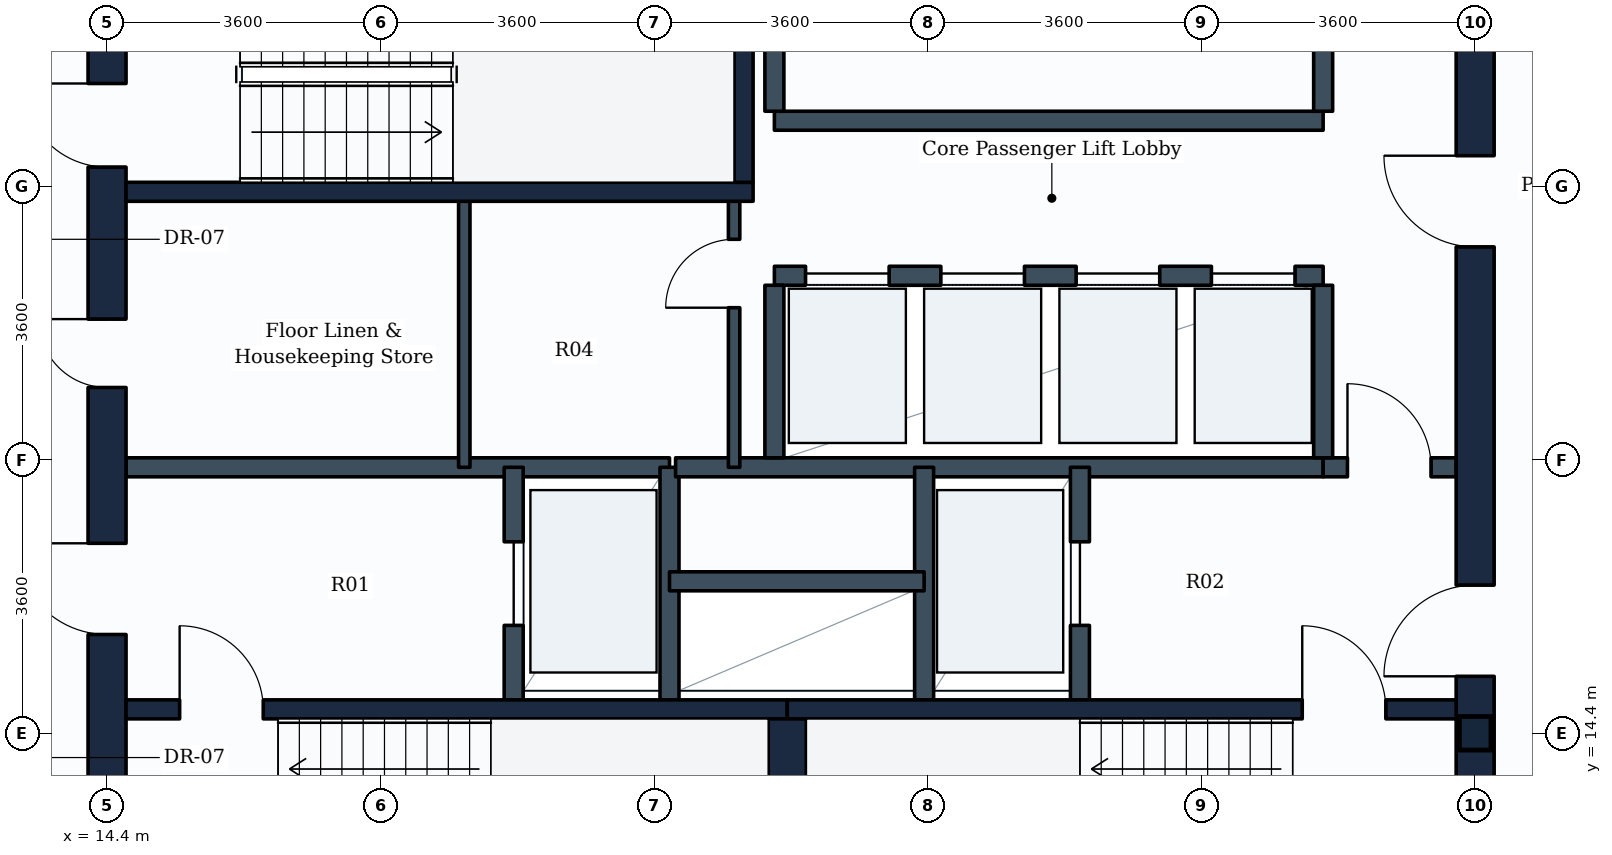
"""IFC4 building model, lengths in metres.
Left out: names, types, materials, properties, quantities, classifications, styles, units other than length and angle.
Written with IfcOpenShell. Run it as: python <this file> out.ifc"""

import sys

from ifc_helpers import new_model, si_unit, direction, frame, frame_2d, origin, origin_2d, place, context, subcontext, project, spatial, rectangle, i_section, extrude, element, fill, save


model = new_model("IFC4")
c1 = context("Model", 3, precision=1e-05, world=origin(), true_north=direction((0.0, 1.0)))
c2 = subcontext(c1, "Body", "Model", "MODEL_VIEW")
j1 = project(units=[si_unit("LENGTHUNIT", "METRE"), si_unit("PLANEANGLEUNIT", "RADIAN")], contexts=[c1])
p1 = place(None, origin())
s1 = spatial("IfcSite", under=j1, at=p1, CompositionType="ELEMENT")
p2 = place(p1, origin())
s2 = spatial("IfcBuilding", under=s1, at=p2, CompositionType="ELEMENT")
p3 = place(p2, frame((0.0, 0.0, 135.2)))
s3 = spatial("IfcBuildingStorey", under=s2, at=p3, CompositionType="ELEMENT", Elevation=135.2)
p4 = place(p3, frame((32.4, 14.4, 0.0), z_axis=(0.0, 0.0, 1.0), x_axis=(1.0, 0.0, 0.0)))
e1 = element("IfcColumn", 1, at=p4, inside=s3, PredefinedType="COLUMN", context=c2, shape_type="SweptSolid", body=[
    extrude(i_section(OverallWidth=0.416, OverallDepth=0.442, WebThickness=0.025, FlangeThickness=0.041, FilletRadius=0.015, at=origin_2d()), origin(), (0.0, 0.0, 1.0), 3.8),
])
p5 = place(p3, frame((14.4, 10.8, 0.0), z_axis=(0.0, 0.0, 1.0), x_axis=(0.0, 1.0, 0.0)))
e2 = element("IfcWall", 2, at=p5, inside=s3, PredefinedType="SHEAR", context=c2, shape_type="SweptSolid", body=[
    extrude(rectangle(XDim=14.4, YDim=0.5, at=frame_2d((7.2, 0.0))), origin(), (0.0, 0.0, 1.0), 3.55),
])
p6 = place(p5, frame((11.05, 0.0, 0.0)))
e3 = element("IfcOpeningElement", 3, at=p6, cuts=e2, PredefinedType="OPENING", context=c2, shape_type="SweptSolid", body=[
    extrude(rectangle(XDim=1.1, YDim=2.1, at=frame_2d((0.55, 1.05))), frame((0.0, 0.26, 0.0), z_axis=(0.0, -1.0, 0.0), x_axis=(1.0, 0.0, 0.0)), (0.0, 0.0, 1.0), 0.52),
])
p7 = place(p5, frame((4.9, 0.0, 0.0)))
e4 = element("IfcOpeningElement", 4, at=p7, cuts=e2, PredefinedType="OPENING", context=c2, shape_type="SweptSolid", body=[
    extrude(rectangle(XDim=1.2, YDim=2.1, at=frame_2d((0.6, 1.05))), frame((0.0, 0.26, 0.0), z_axis=(0.0, -1.0, 0.0), x_axis=(1.0, 0.0, 0.0)), (0.0, 0.0, 1.0), 0.52),
])
p8 = place(p5, frame((8.15, 0.0, 0.0)))
e5 = element("IfcOpeningElement", 5, at=p8, cuts=e2, PredefinedType="OPENING", context=c2, shape_type="SweptSolid", body=[
    extrude(rectangle(XDim=0.9, YDim=2.1, at=frame_2d((0.45, 1.05))), frame((0.0, 0.26, 0.0), z_axis=(0.0, -1.0, 0.0), x_axis=(1.0, 0.0, 0.0)), (0.0, 0.0, 1.0), 0.52),
])
p9 = place(p3, frame((32.4, 10.8, 0.0), z_axis=(0.0, 0.0, 1.0), x_axis=(0.0, 1.0, 0.0)))
e6 = element("IfcWall", 6, at=p9, inside=s3, PredefinedType="SHEAR", context=c2, shape_type="SweptSolid", body=[
    extrude(rectangle(XDim=14.4, YDim=0.5, at=frame_2d((7.2, 0.0))), origin(), (0.0, 0.0, 1.0), 3.55),
])
p10 = place(p9, frame((4.35, 0.0, 0.0)))
e7 = element("IfcOpeningElement", 7, at=p10, cuts=e6, PredefinedType="OPENING", context=c2, shape_type="SweptSolid", body=[
    extrude(rectangle(XDim=1.2, YDim=2.1, at=frame_2d((0.6, 1.05))), frame((0.0, 0.26, 0.0), z_axis=(0.0, -1.0, 0.0), x_axis=(1.0, 0.0, 0.0)), (0.0, 0.0, 1.0), 0.52),
])
p11 = place(p9, frame((10.0, 0.0, 0.0)))
e8 = element("IfcOpeningElement", 8, at=p11, cuts=e6, PredefinedType="OPENING", context=c2, shape_type="SweptSolid", body=[
    extrude(rectangle(XDim=1.2, YDim=2.1, at=frame_2d((0.6, 1.05))), frame((0.0, 0.26, 0.0), z_axis=(0.0, -1.0, 0.0), x_axis=(1.0, 0.0, 0.0)), (0.0, 0.0, 1.0), 0.52),
])
p12 = place(p3, frame((14.65, 14.715, 0.0), z_axis=(0.0, 0.0, 1.0), x_axis=(1.0, 0.0, 0.0)))
e9 = element("IfcWall", 9, at=p12, inside=s3, PredefinedType="SHEAR", context=c2, shape_type="SweptSolid", body=[
    extrude(rectangle(XDim=8.7, YDim=0.25, at=frame_2d((4.35, 0.0))), origin(), (0.0, 0.0, 1.0), 3.55),
])
p13 = place(p12, frame((0.705, 0.0, 0.0)))
e10 = element("IfcOpeningElement", 10, at=p13, cuts=e9, PredefinedType="OPENING", context=c2, shape_type="SweptSolid", body=[
    extrude(rectangle(XDim=1.1, YDim=2.1, at=frame_2d((0.55, 1.05))), frame((0.0, 0.135, 0.0), z_axis=(0.0, -1.0, 0.0), x_axis=(1.0, 0.0, 0.0)), (0.0, 0.0, 1.0), 0.27),
])
p14 = place(p3, frame((23.35, 14.715, 0.0), z_axis=(0.0, 0.0, 1.0), x_axis=(1.0, 0.0, 0.0)))
e11 = element("IfcWall", 11, at=p14, inside=s3, PredefinedType="SHEAR", context=c2, shape_type="SweptSolid", body=[
    extrude(rectangle(XDim=8.8, YDim=0.25, at=frame_2d((4.4, 0.0))), origin(), (0.0, 0.0, 1.0), 3.55),
])
p15 = place(p14, frame((6.775, 0.0, 0.0)))
e12 = element("IfcOpeningElement", 12, at=p15, cuts=e11, PredefinedType="OPENING", context=c2, shape_type="SweptSolid", body=[
    extrude(rectangle(XDim=1.1, YDim=2.1, at=frame_2d((0.55, 1.05))), frame((0.0, 0.135, 0.0), z_axis=(0.0, -1.0, 0.0), x_axis=(1.0, 0.0, 0.0)), (0.0, 0.0, 1.0), 0.27),
])
p16 = place(p3, frame((23.35, 11.75, 0.0), z_axis=(0.0, 0.0, 1.0), x_axis=(0.0, 1.0, 0.0)))
e13 = element("IfcWall", 13, at=p16, inside=s3, PredefinedType="SHEAR", context=c2, shape_type="SweptSolid", body=[
    extrude(rectangle(XDim=2.84, YDim=0.5, at=frame_2d((1.42, 0.0))), origin(), (0.0, 0.0, 1.0), 3.55),
])
p17 = place(p3, frame((14.65, 21.525, 0.0), z_axis=(0.0, 0.0, 1.0), x_axis=(1.0, 0.0, 0.0)))
e14 = element("IfcWall", 14, at=p17, inside=s3, PredefinedType="SHEAR", context=c2, shape_type="SweptSolid", body=[
    extrude(rectangle(XDim=8.25, YDim=0.25, at=frame_2d((4.125, 0.0))), origin(), (0.0, 0.0, 1.0), 3.55),
])
p18 = place(p3, frame((22.775, 21.65, 0.0), z_axis=(0.0, 0.0, 1.0), x_axis=(0.0, 1.0, 0.0)))
e15 = element("IfcWall", 15, at=p18, inside=s3, PredefinedType="SHEAR", context=c2, shape_type="SweptSolid", body=[
    extrude(rectangle(XDim=2.84, YDim=0.25, at=frame_2d((1.42, 0.0))), origin(), (0.0, 0.0, 1.0), 3.55),
])
p19 = place(p3, frame((14.65, 17.9, 0.0), z_axis=(0.0, 0.0, 1.0), x_axis=(1.0, 0.0, 0.0)))
e16 = element("IfcWall", 16, at=p19, inside=s3, PredefinedType="PARTITIONING", context=c2, shape_type="SweptSolid", body=[
    extrude(rectangle(XDim=7.15, YDim=0.25, at=frame_2d((3.575, 0.0))), origin(), (0.0, 0.0, 1.0), 3.535),
])
p20 = place(p3, frame((19.75, 14.84, 0.0), z_axis=(0.0, 0.0, 1.0), x_axis=(0.0, 1.0, 0.0)))
e17 = element("IfcWall", 17, at=p20, inside=s3, PredefinedType="PARTITIONING", context=c2, shape_type="SweptSolid", body=[
    extrude(rectangle(XDim=3.06, YDim=0.25, at=frame_2d((1.53, 0.0))), origin(), (0.0, 0.0, 1.0), 3.535),
])
p21 = place(p20, frame((0.98, 0.0, 0.0)))
e18 = element("IfcOpeningElement", 18, at=p21, cuts=e17, PredefinedType="OPENING", context=c2, shape_type="SweptSolid", body=[
    extrude(rectangle(XDim=1.1, YDim=2.1, at=frame_2d((0.55, 1.05))), frame((0.0, 0.135, 0.0), z_axis=(0.0, -1.0, 0.0), x_axis=(1.0, 0.0, 0.0)), (0.0, 0.0, 1.0), 0.27),
])
p22 = place(p3, frame((21.8, 14.84, 0.0), z_axis=(0.0, 0.0, 1.0), x_axis=(0.0, 1.0, 0.0)))
e19 = element("IfcWall", 19, at=p22, inside=s3, PredefinedType="PARTITIONING", context=c2, shape_type="SweptSolid", body=[
    extrude(rectangle(XDim=3.06, YDim=0.25, at=frame_2d((1.53, 0.0))), origin(), (0.0, 0.0, 1.0), 3.535),
])
p23 = place(p3, frame((21.88, 17.9, 0.0), z_axis=(0.0, 0.0, 1.0), x_axis=(1.0, 0.0, 0.0)))
e20 = element("IfcWall", 20, at=p23, inside=s3, PredefinedType="PARTITIONING", context=c2, shape_type="SweptSolid", body=[
    extrude(rectangle(XDim=8.52, YDim=0.25, at=frame_2d((4.26, 0.0))), origin(), (0.0, 0.0, 1.0), 3.535),
])
p24 = place(p3, frame((30.4, 17.9, 0.0), z_axis=(0.0, 0.0, 1.0), x_axis=(1.0, 0.0, 0.0)))
e21 = element("IfcWall", 21, at=p24, inside=s3, PredefinedType="PARTITIONING", context=c2, shape_type="SweptSolid", body=[
    extrude(rectangle(XDim=1.75, YDim=0.25, at=frame_2d((0.875, 0.0))), origin(), (0.0, 0.0, 1.0), 3.535),
])
p25 = place(p24, frame((0.32, 0.0, 0.0)))
e22 = element("IfcOpeningElement", 22, at=p25, cuts=e21, PredefinedType="OPENING", context=c2, shape_type="SweptSolid", body=[
    extrude(rectangle(XDim=1.1, YDim=2.1, at=frame_2d((0.55, 1.05))), frame((0.0, 0.135, 0.0), z_axis=(0.0, -1.0, 0.0), x_axis=(1.0, 0.0, 0.0)), (0.0, 0.0, 1.0), 0.27),
])
p26 = place(p3, frame((25.15, 14.84, 0.0), z_axis=(0.0, 0.0, 1.0), x_axis=(0.0, 1.0, 0.0)))
e23 = element("IfcWall", 23, at=p26, inside=s3, PredefinedType="PARTITIONING", context=c2, shape_type="SweptSolid", body=[
    extrude(rectangle(XDim=3.06, YDim=0.25, at=frame_2d((1.53, 0.0))), origin(), (0.0, 0.0, 1.0), 3.535),
])
p27 = place(p3, frame((27.2, 14.84, 0.0), z_axis=(0.0, 0.0, 1.0), x_axis=(0.0, 1.0, 0.0)))
e24 = element("IfcWall", 24, at=p27, inside=s3, PredefinedType="PARTITIONING", context=c2, shape_type="SweptSolid", body=[
    extrude(rectangle(XDim=3.06, YDim=0.25, at=frame_2d((1.53, 0.0))), origin(), (0.0, 0.0, 1.0), 3.535),
])
p28 = place(p27, frame((0.98, 0.0, 0.0)))
e25 = element("IfcOpeningElement", 25, at=p28, cuts=e24, PredefinedType="OPENING", context=c2, shape_type="SweptSolid", body=[
    extrude(rectangle(XDim=1.1, YDim=2.1, at=frame_2d((0.55, 1.05))), frame((0.0, 0.135, 0.0), z_axis=(0.0, -1.0, 0.0), x_axis=(1.0, 0.0, 0.0)), (0.0, 0.0, 1.0), 0.27),
])
p29 = place(p3, frame((21.8, 16.4, 0.0), z_axis=(0.0, 0.0, 1.0), x_axis=(1.0, 0.0, 0.0)))
e26 = element("IfcWall", 26, at=p29, inside=s3, PredefinedType="PARTITIONING", context=c2, shape_type="SweptSolid", body=[
    extrude(rectangle(XDim=3.35, YDim=0.25, at=frame_2d((1.675, 0.0))), origin(), (0.0, 0.0, 1.0), 3.535),
])
p30 = place(p3, frame((23.18, 20.42, 0.0), z_axis=(0.0, 0.0, 1.0), x_axis=(1.0, 0.0, 0.0)))
e27 = element("IfcWall", 27, at=p30, inside=s3, PredefinedType="PARTITIONING", context=c2, shape_type="SweptSolid", body=[
    extrude(rectangle(XDim=7.22, YDim=0.25, at=frame_2d((3.61, 0.0))), origin(), (0.0, 0.0, 1.0), 3.535),
])
p31 = place(p30, frame((0.41, 0.0, 0.0)))
e28 = element("IfcOpeningElement", 28, at=p31, cuts=e27, PredefinedType="OPENING", context=c2, shape_type="SweptSolid", body=[
    extrude(rectangle(XDim=1.1, YDim=2.1, at=frame_2d((0.55, 1.05))), frame((0.0, 0.135, 0.0), z_axis=(0.0, -1.0, 0.0), x_axis=(1.0, 0.0, 0.0)), (0.0, 0.0, 1.0), 0.27),
])
p32 = place(p30, frame((2.19, 0.0, 0.0)))
e29 = element("IfcOpeningElement", 29, at=p32, cuts=e27, PredefinedType="OPENING", context=c2, shape_type="SweptSolid", body=[
    extrude(rectangle(XDim=1.1, YDim=2.1, at=frame_2d((0.55, 1.05))), frame((0.0, 0.135, 0.0), z_axis=(0.0, -1.0, 0.0), x_axis=(1.0, 0.0, 0.0)), (0.0, 0.0, 1.0), 0.27),
])
p33 = place(p30, frame((3.97, 0.0, 0.0)))
e30 = element("IfcOpeningElement", 30, at=p33, cuts=e27, PredefinedType="OPENING", context=c2, shape_type="SweptSolid", body=[
    extrude(rectangle(XDim=1.1, YDim=2.1, at=frame_2d((0.55, 1.05))), frame((0.0, 0.135, 0.0), z_axis=(0.0, -1.0, 0.0), x_axis=(1.0, 0.0, 0.0)), (0.0, 0.0, 1.0), 0.27),
])
p34 = place(p30, frame((5.75, 0.0, 0.0)))
e31 = element("IfcOpeningElement", 31, at=p34, cuts=e27, PredefinedType="OPENING", context=c2, shape_type="SweptSolid", body=[
    extrude(rectangle(XDim=1.1, YDim=2.1, at=frame_2d((0.55, 1.05))), frame((0.0, 0.135, 0.0), z_axis=(0.0, -1.0, 0.0), x_axis=(1.0, 0.0, 0.0)), (0.0, 0.0, 1.0), 0.27),
])
for number, where, z_axis, x_axis in (
    (32, (23.18, 18.025, 0.0), (0.0, 0.0, 1.0), (0.0, 1.0, 0.0)),
    (33, (30.4, 18.025, 0.0), (0.0, 0.0, 1.0), (0.0, 1.0, 0.0)),
):
    element("IfcWall", number, at=place(p3, frame(where, z_axis=z_axis, x_axis=x_axis)), inside=s3, PredefinedType="PARTITIONING", context=c2, shape_type="SweptSolid", body=[
        extrude(rectangle(XDim=2.27, YDim=0.25, at=frame_2d((1.135, 0.0))), origin(), (0.0, 0.0, 1.0), 3.535),
    ])
p35 = place(p3, frame((23.18, 22.46, 0.0), z_axis=(0.0, 0.0, 1.0), x_axis=(1.0, 0.0, 0.0)))
e34 = element("IfcWall", 34, at=p35, inside=s3, PredefinedType="PARTITIONING", context=c2, shape_type="SweptSolid", body=[
    extrude(rectangle(XDim=7.22, YDim=0.25, at=frame_2d((3.61, 0.0))), origin(), (0.0, 0.0, 1.0), 3.535),
])
for number, where, z_axis, x_axis in (
    (35, (23.18, 22.585, 0.0), (0.0, 0.0, 1.0), (0.0, 1.0, 0.0)),
    (36, (30.4, 22.585, 0.0), (0.0, 0.0, 1.0), (0.0, 1.0, 0.0)),
):
    element("IfcWall", number, at=place(p3, frame(where, z_axis=z_axis, x_axis=x_axis)), inside=s3, PredefinedType="PARTITIONING", context=c2, shape_type="SweptSolid", body=[
        extrude(rectangle(XDim=2.315, YDim=0.25, at=frame_2d((1.157, 0.0))), origin(), (0.0, 0.0, 1.0), 3.535),
    ])
p36 = place(p3, frame((22.65, 17.9, 0.0), z_axis=(0.0, 0.0, 1.0), x_axis=(0.0, 1.0, 0.0)))
e37 = element("IfcWall", 37, at=p36, inside=s3, PredefinedType="PARTITIONING", context=c2, shape_type="SweptSolid", body=[
    extrude(rectangle(XDim=3.625, YDim=0.15, at=frame_2d((1.812, 0.0))), origin(), (0.0, 0.0, 1.0), 3.535),
])
p37 = place(p36, frame((2.1, 0.0, 0.0)))
e38 = element("IfcOpeningElement", 38, at=p37, cuts=e37, PredefinedType="OPENING", context=c2, shape_type="SweptSolid", body=[
    extrude(rectangle(XDim=0.9, YDim=2.1, at=frame_2d((0.45, 1.05))), frame((0.0, 0.085, 0.0), z_axis=(0.0, -1.0, 0.0), x_axis=(1.0, 0.0, 0.0)), (0.0, 0.0, 1.0), 0.17),
])
p38 = place(p3, frame((19.1, 17.9, 0.0), z_axis=(0.0, 0.0, 1.0), x_axis=(0.0, 1.0, 0.0)))
e39 = element("IfcWall", 39, at=p38, inside=s3, PredefinedType="PARTITIONING", context=c2, shape_type="SweptSolid", body=[
    extrude(rectangle(XDim=3.625, YDim=0.15, at=frame_2d((1.812, 0.0))), origin(), (0.0, 0.0, 1.0), 3.535),
])
p39 = place(p13, origin())
e40 = element("IfcDoor", 40, at=p39, inside=s3, OperationType="SINGLE_SWING_LEFT", PredefinedType="DOOR", context=c2, shape_type="SweptSolid", body=[
    extrude(rectangle(XDim=1.1, YDim=2.1, at=frame_2d((0.55, 1.05))), frame((0.0, 0.025, 0.0), z_axis=(0.0, -1.0, 0.0), x_axis=(1.0, 0.0, 0.0)), (0.0, 0.0, 1.0), 0.05),
])
fill(e10, e40)
p40 = place(p15, origin())
e41 = element("IfcDoor", 41, at=p40, inside=s3, OperationType="SINGLE_SWING_LEFT", PredefinedType="DOOR", context=c2, shape_type="SweptSolid", body=[
    extrude(rectangle(XDim=1.1, YDim=2.1, at=frame_2d((0.55, 1.05))), frame((0.0, 0.025, 0.0), z_axis=(0.0, -1.0, 0.0), x_axis=(1.0, 0.0, 0.0)), (0.0, 0.0, 1.0), 0.05),
])
fill(e12, e41)
p41 = place(p6, origin())
e42 = element("IfcDoor", 42, at=p41, inside=s3, OperationType="SINGLE_SWING_RIGHT", PredefinedType="DOOR", context=c2, shape_type="SweptSolid", body=[
    extrude(rectangle(XDim=1.1, YDim=2.1, at=frame_2d((0.55, 1.05))), frame((0.0, 0.025, 0.0), z_axis=(0.0, -1.0, 0.0), x_axis=(1.0, 0.0, 0.0)), (0.0, 0.0, 1.0), 0.05),
])
fill(e3, e42)
p42 = place(p21, origin())
e43 = element("IfcDoor", 43, at=p42, inside=s3, OperationType="SLIDING_TO_LEFT", PredefinedType="DOOR", context=c2, shape_type="SweptSolid", body=[
    extrude(rectangle(XDim=1.1, YDim=2.1, at=frame_2d((0.55, 1.05))), frame((0.0, 0.025, 0.0), z_axis=(0.0, -1.0, 0.0), x_axis=(1.0, 0.0, 0.0)), (0.0, 0.0, 1.0), 0.05),
])
fill(e18, e43)
p43 = place(p28, origin())
e44 = element("IfcDoor", 44, at=p43, inside=s3, OperationType="SLIDING_TO_LEFT", PredefinedType="DOOR", context=c2, shape_type="SweptSolid", body=[
    extrude(rectangle(XDim=1.1, YDim=2.1, at=frame_2d((0.55, 1.05))), frame((0.0, 0.025, 0.0), z_axis=(0.0, -1.0, 0.0), x_axis=(1.0, 0.0, 0.0)), (0.0, 0.0, 1.0), 0.05),
])
fill(e25, e44)
p44 = place(p7, origin())
e45 = element("IfcDoor", 45, at=p44, inside=s3, OperationType="SINGLE_SWING_RIGHT", PredefinedType="DOOR", context=c2, shape_type="SweptSolid", body=[
    extrude(rectangle(XDim=1.2, YDim=2.1, at=frame_2d((0.6, 1.05))), frame((0.0, 0.025, 0.0), z_axis=(0.0, -1.0, 0.0), x_axis=(1.0, 0.0, 0.0)), (0.0, 0.0, 1.0), 0.05),
])
fill(e4, e45)
p45 = place(p10, origin())
e46 = element("IfcDoor", 46, at=p45, inside=s3, OperationType="SINGLE_SWING_LEFT", PredefinedType="DOOR", context=c2, shape_type="SweptSolid", body=[
    extrude(rectangle(XDim=1.2, YDim=2.1, at=frame_2d((0.6, 1.05))), frame((0.0, 0.025, 0.0), z_axis=(0.0, -1.0, 0.0), x_axis=(1.0, 0.0, 0.0)), (0.0, 0.0, 1.0), 0.05),
])
fill(e7, e46)
p46 = place(p25, origin())
e47 = element("IfcDoor", 47, at=p46, inside=s3, OperationType="SINGLE_SWING_LEFT", PredefinedType="DOOR", context=c2, shape_type="SweptSolid", body=[
    extrude(rectangle(XDim=1.1, YDim=2.1, at=frame_2d((0.55, 1.05))), frame((0.0, 0.025, 0.0), z_axis=(0.0, -1.0, 0.0), x_axis=(1.0, 0.0, 0.0)), (0.0, 0.0, 1.0), 0.05),
])
fill(e22, e47)
p47 = place(p31, origin())
e48 = element("IfcDoor", 48, at=p47, inside=s3, OperationType="SLIDING_TO_LEFT", PredefinedType="DOOR", context=c2, shape_type="SweptSolid", body=[
    extrude(rectangle(XDim=1.1, YDim=2.1, at=frame_2d((0.55, 1.05))), frame((0.0, 0.025, 0.0), z_axis=(0.0, -1.0, 0.0), x_axis=(1.0, 0.0, 0.0)), (0.0, 0.0, 1.0), 0.05),
])
fill(e28, e48)
p48 = place(p32, origin())
e49 = element("IfcDoor", 49, at=p48, inside=s3, OperationType="SLIDING_TO_LEFT", PredefinedType="DOOR", context=c2, shape_type="SweptSolid", body=[
    extrude(rectangle(XDim=1.1, YDim=2.1, at=frame_2d((0.55, 1.05))), frame((0.0, 0.025, 0.0), z_axis=(0.0, -1.0, 0.0), x_axis=(1.0, 0.0, 0.0)), (0.0, 0.0, 1.0), 0.05),
])
fill(e29, e49)
p49 = place(p33, origin())
e50 = element("IfcDoor", 50, at=p49, inside=s3, OperationType="SLIDING_TO_LEFT", PredefinedType="DOOR", context=c2, shape_type="SweptSolid", body=[
    extrude(rectangle(XDim=1.1, YDim=2.1, at=frame_2d((0.55, 1.05))), frame((0.0, 0.025, 0.0), z_axis=(0.0, -1.0, 0.0), x_axis=(1.0, 0.0, 0.0)), (0.0, 0.0, 1.0), 0.05),
])
fill(e30, e50)
p50 = place(p34, origin())
e51 = element("IfcDoor", 51, at=p50, inside=s3, OperationType="SLIDING_TO_LEFT", PredefinedType="DOOR", context=c2, shape_type="SweptSolid", body=[
    extrude(rectangle(XDim=1.1, YDim=2.1, at=frame_2d((0.55, 1.05))), frame((0.0, 0.025, 0.0), z_axis=(0.0, -1.0, 0.0), x_axis=(1.0, 0.0, 0.0)), (0.0, 0.0, 1.0), 0.05),
])
fill(e31, e51)
p51 = place(p11, origin())
e52 = element("IfcDoor", 52, at=p51, inside=s3, OperationType="SINGLE_SWING_RIGHT", PredefinedType="DOOR", context=c2, shape_type="SweptSolid", body=[
    extrude(rectangle(XDim=1.2, YDim=2.1, at=frame_2d((0.6, 1.05))), frame((0.0, 0.025, 0.0), z_axis=(0.0, -1.0, 0.0), x_axis=(1.0, 0.0, 0.0)), (0.0, 0.0, 1.0), 0.05),
])
fill(e8, e52)
p52 = place(p8, origin())
e53 = element("IfcDoor", 53, at=p52, inside=s3, OperationType="SINGLE_SWING_RIGHT", PredefinedType="DOOR", context=c2, shape_type="SweptSolid", body=[
    extrude(rectangle(XDim=0.9, YDim=2.1, at=frame_2d((0.45, 1.05))), frame((0.0, 0.025, 0.0), z_axis=(0.0, -1.0, 0.0), x_axis=(1.0, 0.0, 0.0)), (0.0, 0.0, 1.0), 0.05),
])
fill(e5, e53)
p53 = place(p37, origin())
e54 = element("IfcDoor", 54, at=p53, inside=s3, OperationType="SINGLE_SWING_LEFT", PredefinedType="DOOR", context=c2, shape_type="SweptSolid", body=[
    extrude(rectangle(XDim=0.9, YDim=2.1, at=frame_2d((0.45, 1.05))), frame((0.0, 0.025, 0.0), z_axis=(0.0, -1.0, 0.0), x_axis=(1.0, 0.0, 0.0)), (0.0, 0.0, 1.0), 0.05),
])
fill(e38, e54)
save(model, sys.argv[1])
